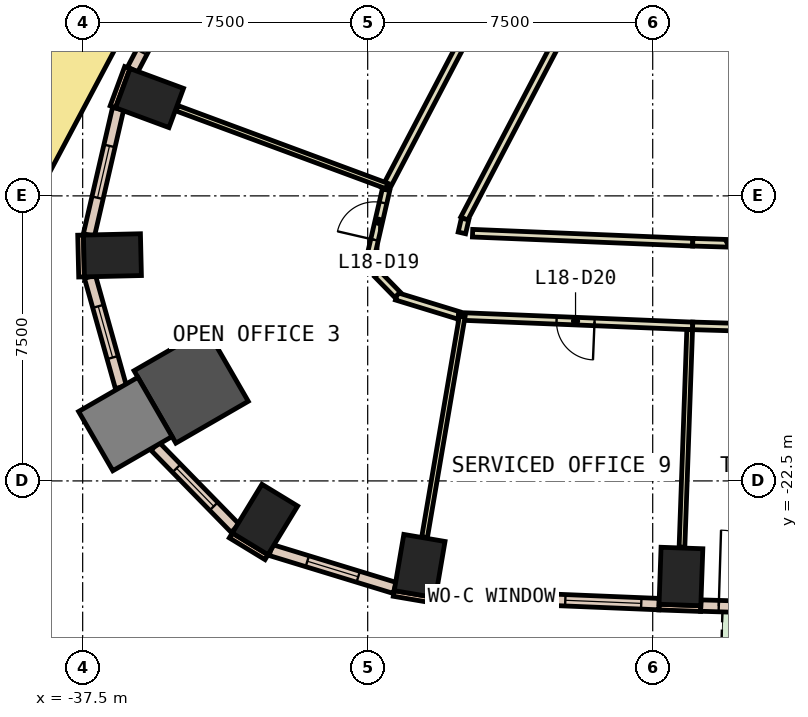
"""IFC4 building model, lengths in metres.
Left out: names, types, materials, properties, quantities, classifications, styles, units other than length and angle.
Written with IfcOpenShell. Run it as: python <this file> out.ifc"""

import sys

from ifc_helpers import new_model, si_unit, direction, frame, frame_2d, origin, origin_2d, place, context, subcontext, project, spatial, rectangle, extrude, element, fill, save


model = new_model("IFC4")
c1 = context("Model", 3, precision=1e-05, world=origin(), true_north=direction((0.0, 1.0)))
c2 = subcontext(c1, "Body", "Model", "MODEL_VIEW")
j1 = project(units=[si_unit("LENGTHUNIT", "METRE"), si_unit("PLANEANGLEUNIT", "RADIAN")], contexts=[c1])
p1 = place(None, origin())
s1 = spatial("IfcSite", under=j1, at=p1, CompositionType="ELEMENT")
p2 = place(p1, origin())
s2 = spatial("IfcBuilding", under=s1, at=p2, CompositionType="ELEMENT")
p3 = place(p2, frame((0.0, 0.0, 86.6)))
s3 = spatial("IfcBuildingStorey", under=s2, at=p3, CompositionType="ELEMENT", Elevation=86.6)
for number, where, z_axis, x_axis in (
    (1, (-28.633, -24.74, 0.0), (0.0, 0.0, 1.0), (-0.986, 0.168, 0.0)),
    (2, (-21.757, -25.015, 0.0), (0.0, 0.0, 1.0), (-0.999, 0.035, 0.0)),
    (3, (-35.741, -12.427, 0.0), (0.0, 0.0, 1.0), (0.347, 0.938, 0.0)),
    (4, (-36.717, -16.564, 0.0), (0.0, 0.0, 1.0), (-0.023, 1.0, 0.0)),
):
    element("IfcColumn", number, at=place(p3, frame(where, z_axis=z_axis, x_axis=x_axis)), inside=s3, PredefinedType="COLUMN", context=c2, shape_type="SweptSolid", body=[
        extrude(rectangle(XDim=1.1, YDim=1.5, at=origin_2d()), origin(), (0.0, 0.0, 1.0), 3.8),
    ])
p4 = place(p3, frame((-34.645, -20.003, 0.0), z_axis=(0.0, 0.0, 1.0), x_axis=(0.866025403784, 0.5, 0.0)))
e5 = element("IfcColumn", 5, at=p4, inside=s3, PredefinedType="COLUMN", context=c2, shape_type="SweptSolid", body=[
    extrude(rectangle(XDim=2.2, YDim=2.2, at=origin_2d()), origin(), (0.0, 0.0, 1.0), 3.8),
])
p5 = place(p3, frame((-32.703, -23.516, 0.0), z_axis=(0.0, 0.0, 1.0), x_axis=(-0.854095929175, 0.520115510024, 0.0)))
e6 = element("IfcColumn", 6, at=p5, inside=s3, PredefinedType="COLUMN", context=c2, shape_type="SweptSolid", body=[
    extrude(rectangle(XDim=1.1, YDim=1.5, at=origin_2d()), origin(), (0.0, 0.0, 1.0), 3.8),
])
p6 = place(p3, frame((-36.377, -21.003, 0.0), z_axis=(0.0, 0.0, 1.0), x_axis=(0.866025403784, 0.5, 0.0)))
e7 = element("IfcColumn", 7, at=p6, inside=s3, PredefinedType="COLUMN", context=c2, shape_type="SweptSolid", body=[
    extrude(rectangle(XDim=1.8, YDim=1.8, at=origin_2d()), origin(), (0.0, 0.0, 1.0), 3.8),
])
p7 = place(p3, frame((-36.324, -11.624, 0.0), z_axis=(0.0, 0.0, 1.0), x_axis=(-0.347205967468, -0.937788897436, 0.0)))
e8 = element("IfcWall", 8, at=p7, inside=s3, PredefinedType="STANDARD", context=c2, shape_type="SweptSolid", body=[
    extrude(rectangle(XDim=1.1, YDim=0.15, at=frame_2d((0.55, 0.0))), origin(), (0.0, 0.0, 1.0), 3.8),
])
p8 = place(p3, frame((-29.314, -25.461, 0.0), z_axis=(0.0, 0.0, 1.0), x_axis=(0.985763338892, -0.168138751323, 0.0)))
e9 = element("IfcWall", 9, at=p8, inside=s3, PredefinedType="STANDARD", context=c2, shape_type="SweptSolid", body=[
    extrude(rectangle(XDim=1.101, YDim=0.15, at=frame_2d((0.55, 0.0))), origin(), (0.0, 0.0, 1.0), 3.8),
])
p9 = place(p3, frame((-22.336, -25.82, 0.0), z_axis=(0.0, 0.0, 1.0), x_axis=(0.999376638472, -0.035303462679, 0.0)))
e10 = element("IfcWall", 10, at=p9, inside=s3, PredefinedType="STANDARD", context=c2, shape_type="SweptSolid", body=[
    extrude(rectangle(XDim=1.1, YDim=0.15, at=frame_2d((0.55, 0.0))), origin(), (0.0, 0.0, 1.0), 3.8),
])
for number, where, z_axis, x_axis in (
    (11, (-37.555, -16.033, 0.0), (0.0, 0.0, 1.0), (0.024, -1.0, 0.0)),
    (12, (-33.602, -23.935, 0.0), (0.0, 0.0, 1.0), (0.854, -0.52, 0.0)),
):
    element("IfcWall", number, at=place(p3, frame(where, z_axis=z_axis, x_axis=x_axis)), inside=s3, PredefinedType="STANDARD", context=c2, shape_type="SweptSolid", body=[
        extrude(rectangle(XDim=1.1, YDim=0.15, at=frame_2d((0.55, 0.0))), origin(), (0.0, 0.0, 1.0), 3.8),
    ])
p10 = place(p3, frame((-28.205, -25.501, 0.0), z_axis=(0.0, 0.0, 1.0), x_axis=(0.999159360905, -0.040994774244, 0.0)))
e13 = element("IfcWall", 13, at=p10, inside=s3, PredefinedType="STANDARD", context=c2, shape_type="SweptSolid", body=[
    extrude(rectangle(XDim=5.878, YDim=0.3, at=frame_2d((2.939, 0.0))), origin(), (0.0, 0.0, 1.0), 3.8),
])
p11 = place(p10, frame((0.469, 0.0, 0.9)))
e14 = element("IfcOpeningElement", 14, at=p11, cuts=e13, PredefinedType="OPENING", context=c2, shape_type="SweptSolid", body=[
    extrude(rectangle(XDim=2.0, YDim=2.6, at=frame_2d((1.0, 1.3))), frame((0.0, 0.16, 0.0), z_axis=(0.0, -1.0, 0.0), x_axis=(1.0, 0.0, 0.0)), (0.0, 0.0, 1.0), 0.32),
])
p12 = place(p10, frame((3.408, 0.0, 0.9)))
e15 = element("IfcOpeningElement", 15, at=p12, cuts=e13, PredefinedType="OPENING", context=c2, shape_type="SweptSolid", body=[
    extrude(rectangle(XDim=2.0, YDim=2.6, at=frame_2d((1.0, 1.3))), frame((0.0, 0.16, 0.0), z_axis=(0.0, -1.0, 0.0), x_axis=(1.0, 0.0, 0.0)), (0.0, 0.0, 1.0), 0.32),
])
p13 = place(p3, frame((-21.235, -25.78, 0.0), z_axis=(0.0, 0.0, 1.0), x_axis=(0.999554487555, -0.029846715213, 0.0)))
e16 = element("IfcWall", 16, at=p13, inside=s3, PredefinedType="STANDARD", context=c2, shape_type="SweptSolid", body=[
    extrude(rectangle(XDim=5.898, YDim=0.3, at=frame_2d((2.949, 0.0))), origin(), (0.0, 0.0, 1.0), 3.8),
])
p14 = place(p13, frame((0.474, 0.0, 0.0)))
e17 = element("IfcOpeningElement", 17, at=p14, cuts=e16, PredefinedType="OPENING", context=c2, shape_type="SweptSolid", body=[
    extrude(rectangle(XDim=2.0, YDim=2.4, at=frame_2d((1.0, 1.2))), frame((0.0, 0.16, 0.0), z_axis=(0.0, -1.0, 0.0), x_axis=(1.0, 0.0, 0.0)), (0.0, 0.0, 1.0), 0.32),
])
p15 = place(p13, frame((3.423, 0.0, 0.9)))
e18 = element("IfcOpeningElement", 18, at=p15, cuts=e16, PredefinedType="OPENING", context=c2, shape_type="SweptSolid", body=[
    extrude(rectangle(XDim=2.0, YDim=2.6, at=frame_2d((1.0, 1.3))), frame((0.0, 0.16, 0.0), z_axis=(0.0, -1.0, 0.0), x_axis=(1.0, 0.0, 0.0)), (0.0, 0.0, 1.0), 0.32),
])
p16 = place(p3, frame((-33.366, -6.295, 0.0), z_axis=(0.0, 0.0, 1.0), x_axis=(-0.464187178015, -0.885737130173, 0.0)))
e19 = element("IfcWall", 19, at=p16, inside=s3, PredefinedType="STANDARD", context=c2, shape_type="SweptSolid", body=[
    extrude(rectangle(XDim=6.075, YDim=0.3, at=frame_2d((3.038, 0.0))), origin(), (0.0, 0.0, 1.0), 3.8),
])
p17 = place(p16, frame((0.519, 0.0, 0.9)))
e20 = element("IfcOpeningElement", 20, at=p17, cuts=e19, PredefinedType="OPENING", context=c2, shape_type="SweptSolid", body=[
    extrude(rectangle(XDim=2.0, YDim=2.6, at=frame_2d((1.0, 1.3))), frame((0.0, 0.16, 0.0), z_axis=(0.0, -1.0, 0.0), x_axis=(1.0, 0.0, 0.0)), (0.0, 0.0, 1.0), 0.32),
])
p18 = place(p16, frame((3.556, 0.0, 0.9)))
e21 = element("IfcOpeningElement", 21, at=p18, cuts=e19, PredefinedType="OPENING", context=c2, shape_type="SweptSolid", body=[
    extrude(rectangle(XDim=2.0, YDim=2.6, at=frame_2d((1.0, 1.3))), frame((0.0, 0.16, 0.0), z_axis=(0.0, -1.0, 0.0), x_axis=(1.0, 0.0, 0.0)), (0.0, 0.0, 1.0), 0.32),
])
p19 = place(p3, frame((-36.568, -12.706, 0.0), z_axis=(0.0, 0.0, 1.0), x_axis=(-0.224859506699, -0.974391195695, 0.0)))
e22 = element("IfcWall", 22, at=p19, inside=s3, PredefinedType="STANDARD", context=c2, shape_type="SweptSolid", body=[
    extrude(rectangle(XDim=3.41, YDim=0.3, at=frame_2d((1.705, 0.0))), origin(), (0.0, 0.0, 1.0), 3.8),
])
p20 = place(p19, frame((1.005, 0.0, 0.9)))
e23 = element("IfcOpeningElement", 23, at=p20, cuts=e22, PredefinedType="OPENING", context=c2, shape_type="SweptSolid", body=[
    extrude(rectangle(XDim=1.4, YDim=2.6, at=frame_2d((0.7, 1.3))), frame((0.0, 0.16, 0.0), z_axis=(0.0, -1.0, 0.0), x_axis=(1.0, 0.0, 0.0)), (0.0, 0.0, 1.0), 0.32),
])
p21 = place(p3, frame((-37.309, -17.127, 0.0), z_axis=(0.0, 0.0, 1.0), x_axis=(0.270176120308, -0.962810918102, 0.0)))
e24 = element("IfcWall", 24, at=p21, inside=s3, PredefinedType="STANDARD", context=c2, shape_type="SweptSolid", body=[
    extrude(rectangle(XDim=3.017, YDim=0.3, at=frame_2d((1.509, 0.0))), origin(), (0.0, 0.0, 1.0), 3.8),
])
p22 = place(p21, frame((0.809, 0.0, 0.9)))
e25 = element("IfcOpeningElement", 25, at=p22, cuts=e24, PredefinedType="OPENING", context=c2, shape_type="SweptSolid", body=[
    extrude(rectangle(XDim=1.4, YDim=2.6, at=frame_2d((0.7, 1.3))), frame((0.0, 0.16, 0.0), z_axis=(0.0, -1.0, 0.0), x_axis=(1.0, 0.0, 0.0)), (0.0, 0.0, 1.0), 0.32),
])
p23 = place(p3, frame((-35.595, -21.589, 0.0), z_axis=(0.0, 0.0, 1.0), x_axis=(0.698928244773, -0.715191798512, 0.0)))
e26 = element("IfcWall", 26, at=p23, inside=s3, PredefinedType="STANDARD", context=c2, shape_type="SweptSolid", body=[
    extrude(rectangle(XDim=3.017, YDim=0.3, at=frame_2d((1.509, 0.0))), origin(), (0.0, 0.0, 1.0), 3.8),
])
p24 = place(p23, frame((0.809, 0.0, 0.9)))
e27 = element("IfcOpeningElement", 27, at=p24, cuts=e26, PredefinedType="OPENING", context=c2, shape_type="SweptSolid", body=[
    extrude(rectangle(XDim=1.4, YDim=2.6, at=frame_2d((0.7, 1.3))), frame((0.0, 0.16, 0.0), z_axis=(0.0, -1.0, 0.0), x_axis=(1.0, 0.0, 0.0)), (0.0, 0.0, 1.0), 0.32),
])
p25 = place(p3, frame((-32.549, -24.319, 0.0), z_axis=(0.0, 0.0, 1.0), x_axis=(0.956317661006, -0.292329490895, 0.0)))
e28 = element("IfcWall", 28, at=p25, inside=s3, PredefinedType="STANDARD", context=c2, shape_type="SweptSolid", body=[
    extrude(rectangle(XDim=3.41, YDim=0.3, at=frame_2d((1.705, 0.0))), origin(), (0.0, 0.0, 1.0), 3.8),
])
p26 = place(p25, frame((1.005, 0.0, 0.9)))
e29 = element("IfcOpeningElement", 29, at=p26, cuts=e28, PredefinedType="OPENING", context=c2, shape_type="SweptSolid", body=[
    extrude(rectangle(XDim=1.4, YDim=2.6, at=frame_2d((0.7, 1.3))), frame((0.0, 0.16, 0.0), z_axis=(0.0, -1.0, 0.0), x_axis=(1.0, 0.0, 0.0)), (0.0, 0.0, 1.0), 0.32),
])
p27 = place(p3, frame((-36.877, -9.544, 0.0), z_axis=(0.0, 0.0, 1.0), x_axis=(-0.468973311577, -0.883212337453, 0.0)))
e30 = element("IfcWall", 30, at=p27, inside=s3, PredefinedType="STANDARD", context=c2, shape_type="SweptSolid", body=[
    extrude(rectangle(XDim=5.299, YDim=1.9, at=frame_2d((2.649, 0.0))), origin(), (0.0, 0.0, 1.0), 0.8),
])
p28 = place(p3, frame((-24.678, -10.29, 0.0), z_axis=(0.0, 0.0, 1.0), x_axis=(-0.464203280494, -0.885728691179, 0.0)))
e31 = element("IfcWall", 31, at=p28, inside=s3, PredefinedType="PARTITIONING", context=c2, shape_type="SweptSolid", body=[
    extrude(rectangle(XDim=5.995, YDim=0.2, at=frame_2d((2.998, 0.0))), origin(), (0.0, 0.0, 1.0), 3.8),
])
p29 = place(p3, frame((-27.437, -15.609, 0.0), z_axis=(0.0, 0.0, 1.0), x_axis=(-0.224098195188, -0.97456656977, 0.0)))
e32 = element("IfcWall", 32, at=p29, inside=s3, PredefinedType="PARTITIONING", context=c2, shape_type="SweptSolid", body=[
    extrude(rectangle(XDim=0.375, YDim=0.2, at=frame_2d((0.188, 0.0))), origin(), (0.0, 0.0, 1.0), 3.8),
])
p30 = place(p3, frame((-27.24, -15.982, 0.0), z_axis=(0.0, 0.0, 1.0), x_axis=(0.999157128819, -0.041049140426, 0.0)))
e33 = element("IfcWall", 33, at=p30, inside=s3, PredefinedType="PARTITIONING", context=c2, shape_type="SweptSolid", body=[
    extrude(rectangle(XDim=5.799, YDim=0.2, at=frame_2d((2.899, 0.0))), origin(), (0.0, 0.0, 1.0), 3.8),
])
p31 = place(p3, frame((-21.446, -16.22, 0.0), z_axis=(0.0, 0.0, 1.0), x_axis=(0.999542625536, -0.030241358047, 0.0)))
e34 = element("IfcWall", 34, at=p31, inside=s3, PredefinedType="PARTITIONING", context=c2, shape_type="SweptSolid", body=[
    extrude(rectangle(XDim=0.928, YDim=0.2, at=frame_2d((0.464, 0.0))), origin(), (0.0, 0.0, 1.0), 3.8),
])
p32 = place(p3, frame((-29.541, -14.829, 0.0), z_axis=(0.0, 0.0, 1.0), x_axis=(0.46422598759, 0.885716790202, 0.0)))
e35 = element("IfcWall", 35, at=p32, inside=s3, PredefinedType="PARTITIONING", context=c2, shape_type="SweptSolid", body=[
    extrude(rectangle(XDim=6.29, YDim=0.2, at=frame_2d((3.145, 0.0))), origin(), (0.0, 0.0, 1.0), 3.8),
])
p33 = place(p3, frame((-27.608, -18.144, 0.0), z_axis=(0.0, 0.0, 1.0), x_axis=(-0.956137025409, 0.292919764852, 0.0)))
e36 = element("IfcWall", 36, at=p33, inside=s3, PredefinedType="PARTITIONING", context=c2, shape_type="SweptSolid", body=[
    extrude(rectangle(XDim=1.707, YDim=0.2, at=frame_2d((0.854, 0.0))), origin(), (0.0, 0.0, 1.0), 3.8),
])
p34 = place(p3, frame((-29.215, -17.602, 0.0), z_axis=(0.0, 0.0, 1.0), x_axis=(-0.698331924638, 0.715774072617, 0.0)))
e37 = element("IfcWall", 37, at=p34, inside=s3, PredefinedType="PARTITIONING", context=c2, shape_type="SweptSolid", body=[
    extrude(rectangle(XDim=0.756, YDim=0.2, at=frame_2d((0.378, 0.0))), origin(), (0.0, 0.0, 1.0), 3.8),
])
p35 = place(p3, frame((-29.701, -17.036, 0.0), z_axis=(0.0, 0.0, 1.0), x_axis=(-0.269792639482, 0.962918444979, 0.0)))
e38 = element("IfcWall", 38, at=p35, inside=s3, PredefinedType="PARTITIONING", context=c2, shape_type="SweptSolid", body=[
    extrude(rectangle(XDim=0.557, YDim=0.2, at=frame_2d((0.278, 0.0))), origin(), (0.0, 0.0, 1.0), 3.8),
])
p36 = place(p3, frame((-29.9, -16.501, 0.0), z_axis=(0.0, 0.0, 1.0), x_axis=(0.224316169854, 0.974516421587, 0.0)))
e39 = element("IfcWall", 39, at=p36, inside=s3, PredefinedType="PARTITIONING", context=c2, shape_type="SweptSolid", body=[
    extrude(rectangle(XDim=1.707, YDim=0.2, at=frame_2d((0.853, 0.0))), origin(), (0.0, 0.0, 1.0), 3.8),
])
p37 = place(p36, frame((0.353, 0.0, 0.0)))
e40 = element("IfcOpeningElement", 40, at=p37, cuts=e39, PredefinedType="OPENING", context=c2, shape_type="SweptSolid", body=[
    extrude(rectangle(XDim=1.0, YDim=2.1, at=frame_2d((0.5, 1.05))), frame((0.0, 0.11, 0.0), z_axis=(0.0, -1.0, 0.0), x_axis=(1.0, 0.0, 0.0)), (0.0, 0.0, 1.0), 0.22),
])
p38 = place(p3, frame((-21.449, -18.422, 0.0), z_axis=(0.0, 0.0, 1.0), x_axis=(-0.999157588083, 0.041037960189, 0.0)))
e41 = element("IfcWall", 41, at=p38, inside=s3, PredefinedType="PARTITIONING", context=c2, shape_type="SweptSolid", body=[
    extrude(rectangle(XDim=6.169, YDim=0.2, at=frame_2d((3.084, 0.0))), origin(), (0.0, 0.0, 1.0), 3.8),
])
p39 = place(p38, frame((2.584, 0.0, 0.0)))
e42 = element("IfcOpeningElement", 42, at=p39, cuts=e41, PredefinedType="OPENING", context=c2, shape_type="SweptSolid", body=[
    extrude(rectangle(XDim=1.0, YDim=2.1, at=frame_2d((0.5, 1.05))), frame((0.0, 0.11, 0.0), z_axis=(0.0, -1.0, 0.0), x_axis=(1.0, 0.0, 0.0)), (0.0, 0.0, 1.0), 0.22),
])
p40 = place(p3, frame((-14.539, -18.626, 0.0), z_axis=(0.0, 0.0, 1.0), x_axis=(-0.999555675329, 0.029806910574, 0.0)))
e43 = element("IfcWall", 43, at=p40, inside=s3, PredefinedType="PARTITIONING", context=c2, shape_type="SweptSolid", body=[
    extrude(rectangle(XDim=6.913, YDim=0.2, at=frame_2d((3.457, 0.0))), origin(), (0.0, 0.0, 1.0), 3.8),
])
p41 = place(p40, frame((3.031, 0.0, 0.0)))
e44 = element("IfcOpeningElement", 44, at=p41, cuts=e43, PredefinedType="OPENING", context=c2, shape_type="SweptSolid", body=[
    extrude(rectangle(XDim=1.0, YDim=2.1, at=frame_2d((0.5, 1.05))), frame((0.0, 0.11, 0.0), z_axis=(0.0, -1.0, 0.0), x_axis=(1.0, 0.0, 0.0)), (0.0, 0.0, 1.0), 0.22),
])
p42 = place(p3, frame((-13.072, -12.009, 0.0), z_axis=(0.0, 0.0, 1.0), x_axis=(-0.865993734772, -0.500054848326, 0.0)))
e45 = element("IfcWall", 45, at=p42, inside=s3, PredefinedType="PARTITIONING", context=c2, shape_type="SweptSolid", body=[
    extrude(rectangle(XDim=8.583, YDim=0.2, at=frame_2d((4.292, 0.0))), origin(), (0.0, 0.0, 1.0), 3.8),
])
p43 = place(p3, frame((-29.494, -14.741, 0.0), z_axis=(0.0, 0.0, 1.0), x_axis=(-0.937719767819, 0.347392626636, 0.0)))
e46 = element("IfcWall", 46, at=p43, inside=s3, PredefinedType="PARTITIONING", context=c2, shape_type="SweptSolid", body=[
    extrude(rectangle(XDim=5.892, YDim=0.15, at=frame_2d((2.946, 0.0))), origin(), (0.0, 0.0, 1.0), 3.8),
])
p44 = place(p3, frame((-27.513, -18.173, 0.0), z_axis=(0.0, 0.0, 1.0), x_axis=(-0.168033262309, -0.985781326034, 0.0)))
e47 = element("IfcWall", 47, at=p44, inside=s3, PredefinedType="PARTITIONING", context=c2, shape_type="SweptSolid", body=[
    extrude(rectangle(XDim=5.892, YDim=0.15, at=frame_2d((2.946, 0.0))), origin(), (0.0, 0.0, 1.0), 3.8),
])
p45 = place(p3, frame((-21.527, -18.519, 0.0), z_axis=(0.0, 0.0, 1.0), x_axis=(-0.035408838092, -0.999372910472, 0.0)))
e48 = element("IfcWall", 48, at=p45, inside=s3, PredefinedType="PARTITIONING", context=c2, shape_type="SweptSolid", body=[
    extrude(rectangle(XDim=5.73, YDim=0.15, at=frame_2d((2.865, 0.0))), origin(), (0.0, 0.0, 1.0), 3.8),
])
p46 = place(p11, origin())
e49 = element("IfcWindow", 49, at=p46, inside=s3, PartitioningType="SINGLE_PANEL", PredefinedType="WINDOW", context=c2, shape_type="SweptSolid", body=[
    extrude(rectangle(XDim=2.0, YDim=2.6, at=frame_2d((1.0, 1.3))), frame((0.0, 0.03, 0.0), z_axis=(0.0, -1.0, 0.0), x_axis=(1.0, 0.0, 0.0)), (0.0, 0.0, 1.0), 0.06),
])
fill(e14, e49)
p47 = place(p12, origin())
e50 = element("IfcWindow", 50, at=p47, inside=s3, PartitioningType="SINGLE_PANEL", PredefinedType="WINDOW", context=c2, shape_type="SweptSolid", body=[
    extrude(rectangle(XDim=2.0, YDim=2.6, at=frame_2d((1.0, 1.3))), frame((0.0, 0.03, 0.0), z_axis=(0.0, -1.0, 0.0), x_axis=(1.0, 0.0, 0.0)), (0.0, 0.0, 1.0), 0.06),
])
fill(e15, e50)
p48 = place(p14, origin())
e51 = element("IfcDoor", 51, at=p48, inside=s3, OperationType="SLIDING_TO_LEFT", PredefinedType="DOOR", context=c2, shape_type="SweptSolid", body=[
    extrude(rectangle(XDim=2.0, YDim=2.4, at=frame_2d((1.0, 1.2))), frame((0.0, 0.025, 0.0), z_axis=(0.0, -1.0, 0.0), x_axis=(1.0, 0.0, 0.0)), (0.0, 0.0, 1.0), 0.05),
])
fill(e17, e51)
p49 = place(p18, origin())
e52 = element("IfcWindow", 52, at=p49, inside=s3, PartitioningType="SINGLE_PANEL", PredefinedType="WINDOW", context=c2, shape_type="SweptSolid", body=[
    extrude(rectangle(XDim=2.0, YDim=2.6, at=frame_2d((1.0, 1.3))), frame((0.0, 0.03, 0.0), z_axis=(0.0, -1.0, 0.0), x_axis=(1.0, 0.0, 0.0)), (0.0, 0.0, 1.0), 0.06),
])
fill(e21, e52)
p50 = place(p20, origin())
e53 = element("IfcWindow", 53, at=p50, inside=s3, PartitioningType="SINGLE_PANEL", PredefinedType="WINDOW", context=c2, shape_type="SweptSolid", body=[
    extrude(rectangle(XDim=1.4, YDim=2.6, at=frame_2d((0.7, 1.3))), frame((0.0, 0.03, 0.0), z_axis=(0.0, -1.0, 0.0), x_axis=(1.0, 0.0, 0.0)), (0.0, 0.0, 1.0), 0.06),
])
fill(e23, e53)
p51 = place(p22, origin())
e54 = element("IfcWindow", 54, at=p51, inside=s3, PartitioningType="SINGLE_PANEL", PredefinedType="WINDOW", context=c2, shape_type="SweptSolid", body=[
    extrude(rectangle(XDim=1.4, YDim=2.6, at=frame_2d((0.7, 1.3))), frame((0.0, 0.03, 0.0), z_axis=(0.0, -1.0, 0.0), x_axis=(1.0, 0.0, 0.0)), (0.0, 0.0, 1.0), 0.06),
])
fill(e25, e54)
p52 = place(p24, origin())
e55 = element("IfcWindow", 55, at=p52, inside=s3, PartitioningType="SINGLE_PANEL", PredefinedType="WINDOW", context=c2, shape_type="SweptSolid", body=[
    extrude(rectangle(XDim=1.4, YDim=2.6, at=frame_2d((0.7, 1.3))), frame((0.0, 0.03, 0.0), z_axis=(0.0, -1.0, 0.0), x_axis=(1.0, 0.0, 0.0)), (0.0, 0.0, 1.0), 0.06),
])
fill(e27, e55)
p53 = place(p26, origin())
e56 = element("IfcWindow", 56, at=p53, inside=s3, PartitioningType="SINGLE_PANEL", PredefinedType="WINDOW", context=c2, shape_type="SweptSolid", body=[
    extrude(rectangle(XDim=1.4, YDim=2.6, at=frame_2d((0.7, 1.3))), frame((0.0, 0.03, 0.0), z_axis=(0.0, -1.0, 0.0), x_axis=(1.0, 0.0, 0.0)), (0.0, 0.0, 1.0), 0.06),
])
fill(e29, e56)
p54 = place(p37, origin())
e57 = element("IfcDoor", 57, at=p54, inside=s3, OperationType="SINGLE_SWING_RIGHT", PredefinedType="DOOR", context=c2, shape_type="SweptSolid", body=[
    extrude(rectangle(XDim=1.0, YDim=2.1, at=frame_2d((0.5, 1.05))), frame((0.0, 0.025, 0.0), z_axis=(0.0, -1.0, 0.0), x_axis=(1.0, 0.0, 0.0)), (0.0, 0.0, 1.0), 0.05),
])
fill(e40, e57)
p55 = place(p39, origin())
e58 = element("IfcDoor", 58, at=p55, inside=s3, OperationType="SINGLE_SWING_LEFT", PredefinedType="DOOR", context=c2, shape_type="SweptSolid", body=[
    extrude(rectangle(XDim=1.0, YDim=2.1, at=frame_2d((0.5, 1.05))), frame((0.0, 0.025, 0.0), z_axis=(0.0, -1.0, 0.0), x_axis=(1.0, 0.0, 0.0)), (0.0, 0.0, 1.0), 0.05),
])
fill(e42, e58)
save(model, sys.argv[1])
